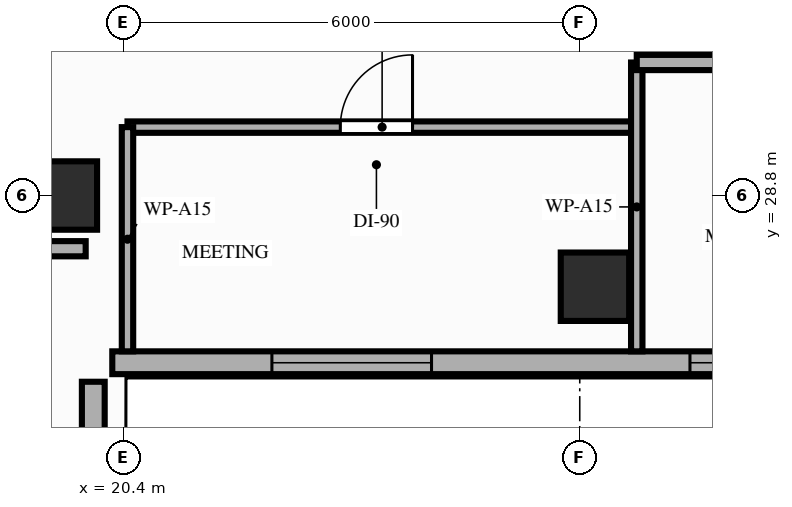
"""IFC4 building model, lengths in metres.
Left out: names, types, materials, properties, quantities, classifications, styles, units other than length and angle.
Written with IfcOpenShell. Run it as: python <this file> out.ifc"""

import sys

from ifc_helpers import new_model, si_unit, direction, frame, frame_2d, origin, origin_2d, place, context, subcontext, project, spatial, rectangle, extrude, element, fill, save


model = new_model("IFC4")
c1 = context("Model", 3, precision=1e-05, world=origin(), true_north=direction((0.0, 1.0)))
c2 = subcontext(c1, "Body", "Model", "MODEL_VIEW")
j1 = project(units=[si_unit("LENGTHUNIT", "METRE"), si_unit("PLANEANGLEUNIT", "RADIAN")], contexts=[c1])
p1 = place(None, origin())
s1 = spatial("IfcSite", under=j1, at=p1, CompositionType="ELEMENT")
p2 = place(p1, origin())
s2 = spatial("IfcBuilding", under=s1, at=p2, CompositionType="ELEMENT")
p3 = place(p2, frame((0.0, 0.0, 169.6)))
s3 = spatial("IfcBuildingStorey", under=s2, at=p3, CompositionType="ELEMENT", Elevation=169.6)
for number, where, z_axis, x_axis in (
    (1, (19.6, 28.8, 0.0), (0.0, 0.0, 1.0), (1.0, 0.0, 0.0)),
    (2, (26.6, 27.6, 0.0), (0.0, 0.0, 1.0), (1.0, 0.0, 0.0)),
):
    element("IfcColumn", number, at=place(p3, frame(where, z_axis=z_axis, x_axis=x_axis)), inside=s3, PredefinedType="COLUMN", context=c2, shape_type="SweptSolid", body=[
        extrude(rectangle(XDim=0.9, YDim=0.9, at=origin_2d()), origin(), (0.0, 0.0, 1.0), 3.2),
    ])
p4 = place(p3, frame((20.0, 8.8, 0.0), z_axis=(0.0, 0.0, 1.0), x_axis=(0.0, 1.0, 0.0)))
e3 = element("IfcWall", 3, at=p4, inside=s3, PredefinedType="STANDARD", context=c2, shape_type="SweptSolid", body=[
    extrude(rectangle(XDim=17.55, YDim=0.3, at=frame_2d((8.775, 0.0))), origin(), (0.0, 0.0, 1.0), 2.45),
])
p5 = place(p4, frame((4.58, 0.0, 0.85)))
e4 = element("IfcOpeningElement", 4, at=p5, cuts=e3, PredefinedType="OPENING", context=c2, shape_type="SweptSolid", body=[
    extrude(rectangle(XDim=0.8, YDim=1.35, at=frame_2d((0.4, 0.675))), frame((0.0, 0.16, 0.0), z_axis=(0.0, -1.0, 0.0), x_axis=(1.0, 0.0, 0.0)), (0.0, 0.0, 1.0), 0.32),
])
p6 = place(p4, frame((5.95, 0.0, 0.85)))
e5 = element("IfcOpeningElement", 5, at=p6, cuts=e3, PredefinedType="OPENING", context=c2, shape_type="SweptSolid", body=[
    extrude(rectangle(XDim=1.1, YDim=1.35, at=frame_2d((0.55, 0.675))), frame((0.0, 0.16, 0.0), z_axis=(0.0, -1.0, 0.0), x_axis=(1.0, 0.0, 0.0)), (0.0, 0.0, 1.0), 0.32),
])
p7 = place(p3, frame((20.25, 26.6, 0.0), z_axis=(0.0, 0.0, 1.0), x_axis=(1.0, 0.0, 0.0)))
e6 = element("IfcWall", 6, at=p7, inside=s3, PredefinedType="STANDARD", context=c2, shape_type="SweptSolid", body=[
    extrude(rectangle(XDim=21.35, YDim=0.3, at=frame_2d((10.675, 0.0))), origin(), (0.0, 0.0, 1.0), 2.71),
])
p8 = place(p7, frame((13.9, 0.0, 0.0)))
e7 = element("IfcOpeningElement", 7, at=p8, cuts=e6, PredefinedType="OPENING", context=c2, shape_type="SweptSolid", body=[
    extrude(rectangle(XDim=1.3, YDim=2.08, at=frame_2d((0.65, 1.04))), frame((0.0, 0.16, 0.0), z_axis=(0.0, -1.0, 0.0), x_axis=(1.0, 0.0, 0.0)), (0.0, 0.0, 1.0), 0.32),
])
p9 = place(p7, frame((17.73, 0.0, 0.85)))
e8 = element("IfcOpeningElement", 8, at=p9, cuts=e6, PredefinedType="OPENING", context=c2, shape_type="SweptSolid", body=[
    extrude(rectangle(XDim=2.1, YDim=1.61, at=frame_2d((1.05, 0.805))), frame((0.0, 0.16, 0.0), z_axis=(0.0, -1.0, 0.0), x_axis=(1.0, 0.0, 0.0)), (0.0, 0.0, 1.0), 0.32),
])
p10 = place(p7, frame((2.1, 0.0, 0.85)))
e9 = element("IfcOpeningElement", 9, at=p10, cuts=e6, PredefinedType="OPENING", context=c2, shape_type="SweptSolid", body=[
    extrude(rectangle(XDim=2.1, YDim=1.61, at=frame_2d((1.05, 0.805))), frame((0.0, 0.16, 0.0), z_axis=(0.0, -1.0, 0.0), x_axis=(1.0, 0.0, 0.0)), (0.0, 0.0, 1.0), 0.32),
])
p11 = place(p7, frame((7.6, 0.0, 0.85)))
e10 = element("IfcOpeningElement", 10, at=p11, cuts=e6, PredefinedType="OPENING", context=c2, shape_type="SweptSolid", body=[
    extrude(rectangle(XDim=2.1, YDim=1.61, at=frame_2d((1.05, 0.805))), frame((0.0, 0.16, 0.0), z_axis=(0.0, -1.0, 0.0), x_axis=(1.0, 0.0, 0.0)), (0.0, 0.0, 1.0), 0.32),
])
p12 = place(p3, frame((11.01, 28.1, 0.0), z_axis=(0.0, 0.0, 1.0), x_axis=(1.0, 0.0, 0.0)))
e11 = element("IfcWall", 11, at=p12, inside=s3, PredefinedType="PARTITIONING", context=c2, shape_type="SweptSolid", body=[
    extrude(rectangle(XDim=8.89, YDim=0.2, at=frame_2d((4.445, 0.0))), origin(), (0.0, 0.0, 1.0), 2.45),
])
p13 = place(p3, frame((20.45, 29.7, 0.0), z_axis=(0.0, 0.0, 1.0), x_axis=(1.0, 0.0, 0.0)))
e12 = element("IfcWall", 12, at=p13, inside=s3, PredefinedType="PARTITIONING", context=c2, shape_type="SweptSolid", body=[
    extrude(rectangle(XDim=6.7, YDim=0.15, at=frame_2d((3.35, 0.0))), origin(), (0.0, 0.0, 1.0), 3.02),
])
p14 = place(p13, frame((2.8, 0.0, 0.0)))
e13 = element("IfcOpeningElement", 13, at=p14, cuts=e12, PredefinedType="OPENING", context=c2, shape_type="SweptSolid", body=[
    extrude(rectangle(XDim=0.95, YDim=2.15, at=frame_2d((0.475, 1.075))), frame((0.0, 0.085, 0.0), z_axis=(0.0, -1.0, 0.0), x_axis=(1.0, 0.0, 0.0)), (0.0, 0.0, 1.0), 0.17),
])
p15 = place(p3, frame((20.45, 26.75, 0.0), z_axis=(0.0, 0.0, 1.0), x_axis=(0.0, 1.0, 0.0)))
e14 = element("IfcWall", 14, at=p15, inside=s3, PredefinedType="PARTITIONING", context=c2, shape_type="SweptSolid", body=[
    extrude(rectangle(XDim=2.95, YDim=0.15, at=frame_2d((1.475, 0.0))), origin(), (0.0, 0.0, 1.0), 2.45),
])
p16 = place(p3, frame((27.15, 26.75, 0.0), z_axis=(0.0, 0.0, 1.0), x_axis=(0.0, 1.0, 0.0)))
e15 = element("IfcWall", 15, at=p16, inside=s3, PredefinedType="PARTITIONING", context=c2, shape_type="SweptSolid", body=[
    extrude(rectangle(XDim=3.8, YDim=0.15, at=frame_2d((1.9, 0.0))), origin(), (0.0, 0.0, 1.0), 2.45),
])
p17 = place(p3, frame((27.15, 30.55, 0.0), z_axis=(0.0, 0.0, 1.0), x_axis=(1.0, 0.0, 0.0)))
e16 = element("IfcWall", 16, at=p17, inside=s3, PredefinedType="PARTITIONING", context=c2, shape_type="SweptSolid", body=[
    extrude(rectangle(XDim=9.45, YDim=0.2, at=frame_2d((4.725, 0.0))), origin(), (0.0, 0.0, 1.0), 2.45),
])
p18 = place(p17, frame((2.5, 0.0, 0.0)))
e17 = element("IfcOpeningElement", 17, at=p18, cuts=e16, PredefinedType="OPENING", context=c2, shape_type="SweptSolid", body=[
    extrude(rectangle(XDim=0.95, YDim=2.15, at=frame_2d((0.475, 1.075))), frame((0.0, 0.11, 0.0), z_axis=(0.0, -1.0, 0.0), x_axis=(1.0, 0.0, 0.0)), (0.0, 0.0, 1.0), 0.22),
])
p19 = place(p17, frame((7.22, 0.0, 0.0)))
e18 = element("IfcOpeningElement", 18, at=p19, cuts=e16, PredefinedType="OPENING", context=c2, shape_type="SweptSolid", body=[
    extrude(rectangle(XDim=0.95, YDim=2.15, at=frame_2d((0.475, 1.075))), frame((0.0, 0.11, 0.0), z_axis=(0.0, -1.0, 0.0), x_axis=(1.0, 0.0, 0.0)), (0.0, 0.0, 1.0), 0.22),
])
p20 = place(p10, origin())
e19 = element("IfcWindow", 19, at=p20, inside=s3, PartitioningType="SINGLE_PANEL", PredefinedType="WINDOW", context=c2, shape_type="SweptSolid", body=[
    extrude(rectangle(XDim=2.1, YDim=1.61, at=frame_2d((1.05, 0.805))), frame((0.0, 0.03, 0.0), z_axis=(0.0, -1.0, 0.0), x_axis=(1.0, 0.0, 0.0)), (0.0, 0.0, 1.0), 0.06),
])
fill(e9, e19)
p21 = place(p11, origin())
e20 = element("IfcWindow", 20, at=p21, inside=s3, PartitioningType="SINGLE_PANEL", PredefinedType="WINDOW", context=c2, shape_type="SweptSolid", body=[
    extrude(rectangle(XDim=2.1, YDim=1.61, at=frame_2d((1.05, 0.805))), frame((0.0, 0.03, 0.0), z_axis=(0.0, -1.0, 0.0), x_axis=(1.0, 0.0, 0.0)), (0.0, 0.0, 1.0), 0.06),
])
fill(e10, e20)
p22 = place(p14, origin())
e21 = element("IfcDoor", 21, at=p22, inside=s3, OperationType="SINGLE_SWING_RIGHT", PredefinedType="DOOR", context=c2, shape_type="SweptSolid", body=[
    extrude(rectangle(XDim=0.95, YDim=2.15, at=frame_2d((0.475, 1.075))), frame((0.0, 0.025, 0.0), z_axis=(0.0, -1.0, 0.0), x_axis=(1.0, 0.0, 0.0)), (0.0, 0.0, 1.0), 0.05),
])
fill(e13, e21)
save(model, sys.argv[1])
